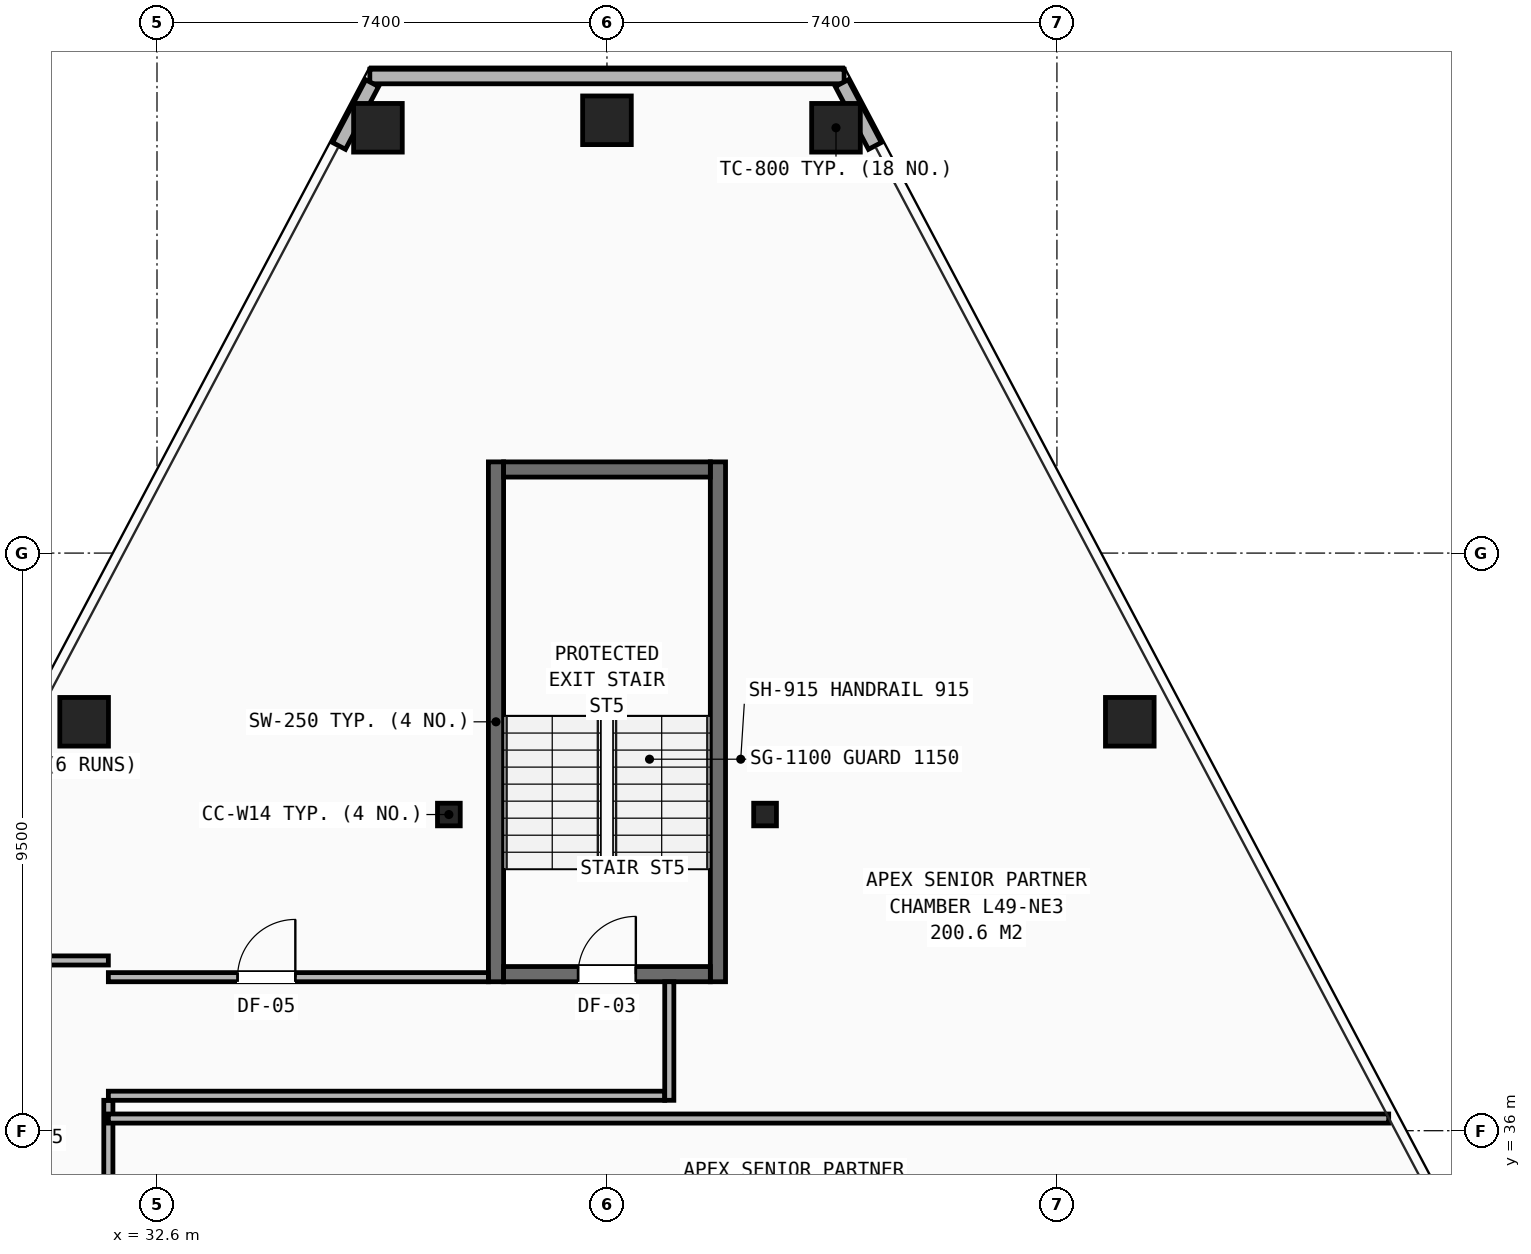
"""IFC4 building model, lengths in metres.
Left out: names, types, materials, properties, quantities, classifications, styles, units other than length and angle.
Written with IfcOpenShell. Run it as: python <this file> out.ifc"""

import sys

from ifc_helpers import new_model, si_unit, direction, frame, frame_2d, origin, origin_2d, place, context, subcontext, project, spatial, rectangle, hollow_rectangle, i_section, extrude, element, fill, save


model = new_model("IFC4")
c1 = context("Model", 3, precision=1e-05, world=origin(), true_north=direction((0.0, 1.0)))
c2 = subcontext(c1, "Body", "Model", "MODEL_VIEW")
j1 = project(units=[si_unit("LENGTHUNIT", "METRE"), si_unit("PLANEANGLEUNIT", "RADIAN")], contexts=[c1])
p1 = place(None, origin())
s1 = spatial("IfcSite", under=j1, at=p1, CompositionType="ELEMENT")
p2 = place(p1, origin())
s2 = spatial("IfcBuilding", under=s1, at=p2, CompositionType="ELEMENT")
p3 = place(p2, frame((0.0, 0.0, 172.35)))
s3 = spatial("IfcBuildingStorey", under=s2, at=p3, CompositionType="ELEMENT", Elevation=172.35)
for number, where, z_axis, x_axis in (
    (1, (37.4, 41.2, 0.0), (0.0, 0.0, 1.0), (1.0, 0.0, 0.0)),
    (2, (42.6, 41.2, 0.0), (0.0, 0.0, 1.0), (1.0, 0.0, 0.0)),
):
    element("IfcColumn", number, at=place(p3, frame(where, z_axis=z_axis, x_axis=x_axis)), inside=s3, PredefinedType="COLUMN", context=c2, shape_type="SweptSolid", body=[
        extrude(i_section(OverallWidth=0.374, OverallDepth=0.372, WebThickness=0.016, FlangeThickness=0.026, at=origin_2d()), origin(), (0.0, 0.0, 1.0), 3.45),
    ])
for number, where, z_axis, x_axis in (
    (3, (43.767, 52.495, 0.0), (0.0, 0.0, 1.0), (1.0, 0.0, 0.0)),
    (4, (40.0, 52.618, 0.0), (0.0, 0.0, 1.0), (1.0, 0.0, 0.0)),
    (5, (36.233, 52.495, 0.0), (0.0, 0.0, 1.0), (1.0, 0.0, 0.0)),
    (6, (31.402, 42.726, 0.0), (0.0, 0.0, 1.0), (1.0, 0.0, 0.0)),
    (7, (48.598, 42.726, 0.0), (0.0, 0.0, 1.0), (1.0, 0.0, 0.0)),
):
    element("IfcColumn", number, at=place(p3, frame(where, z_axis=z_axis, x_axis=x_axis)), inside=s3, PredefinedType="COLUMN", context=c2, shape_type="SweptSolid", body=[
        extrude(hollow_rectangle(XDim=0.8, YDim=0.8, WallThickness=0.055, at=origin_2d()), origin(), (0.0, 0.0, 1.0), 3.45),
    ])
p4 = place(p3, frame((36.1, 53.338, 0.0), z_axis=(0.0, 0.0, 1.0), x_axis=(1.0, 0.0, 0.0)))
e8 = element("IfcWall", 8, at=p4, inside=s3, PredefinedType="SHEAR", context=c2, shape_type="SweptSolid", body=[
    extrude(rectangle(XDim=7.8, YDim=0.24, at=frame_2d((3.9, 0.0))), origin(), (0.0, 0.0, 1.0), 2.583),
])
for number, where, z_axis, x_axis in (
    (9, (36.139, 53.229, 0.0), (0.0, 0.0, 1.0), (-0.467, -0.884, 0.0)),
    (10, (44.407, 52.197, 0.0), (0.0, 0.0, 1.0), (-0.467, 0.884, 0.0)),
):
    element("IfcWall", number, at=place(p3, frame(where, z_axis=z_axis, x_axis=x_axis)), inside=s3, PredefinedType="SHEAR", context=c2, shape_type="SweptSolid", body=[
        extrude(rectangle(XDim=1.167, YDim=0.24, at=frame_2d((0.584, 0.0))), origin(), (0.0, 0.0, 1.0), 2.583),
    ])
p5 = place(p3, frame((31.8, 31.2, 0.0), z_axis=(0.0, 0.0, 1.0), x_axis=(0.0, 1.0, 0.0)))
e11 = element("IfcWall", 11, at=p5, inside=s3, PredefinedType="PARTITIONING", context=c2, shape_type="SweptSolid", body=[
    extrude(rectangle(XDim=5.3, YDim=0.15, at=frame_2d((2.65, 0.0))), origin(), (0.0, 0.0, 1.0), 2.252),
])
p6 = place(p5, frame((0.5, 0.0, 0.0)))
e12 = element("IfcOpeningElement", 12, at=p6, cuts=e11, PredefinedType="OPENING", context=c2, shape_type="SweptSolid", body=[
    extrude(rectangle(XDim=0.95, YDim=2.1, at=frame_2d((0.475, 1.05))), frame((0.0, 0.085, 0.0), z_axis=(0.0, -1.0, 0.0), x_axis=(1.0, 0.0, 0.0)), (0.0, 0.0, 1.0), 0.17),
])
p7 = place(p5, frame((2.9, 0.0, 0.0)))
e13 = element("IfcOpeningElement", 13, at=p7, cuts=e11, PredefinedType="OPENING", context=c2, shape_type="SweptSolid", body=[
    extrude(rectangle(XDim=0.95, YDim=2.1, at=frame_2d((0.475, 1.05))), frame((0.0, 0.085, 0.0), z_axis=(0.0, -1.0, 0.0), x_axis=(1.0, 0.0, 0.0)), (0.0, 0.0, 1.0), 0.17),
])
p8 = place(p3, frame((29.6, 38.8, 0.0), z_axis=(0.0, 0.0, 1.0), x_axis=(1.0, 0.0, 0.0)))
e14 = element("IfcWall", 14, at=p8, inside=s3, PredefinedType="PARTITIONING", context=c2, shape_type="SweptSolid", body=[
    extrude(rectangle(XDim=2.2, YDim=0.15, at=frame_2d((1.1, 0.0))), origin(), (0.0, 0.0, 1.0), 2.589),
])
p9 = place(p3, frame((31.8, 36.2, 0.0), z_axis=(0.0, 0.0, 1.0), x_axis=(1.0, 0.0, 0.0)))
e15 = element("IfcWall", 15, at=p9, inside=s3, PredefinedType="PARTITIONING", context=c2, shape_type="SweptSolid", body=[
    extrude(rectangle(XDim=21.056, YDim=0.15, at=frame_2d((10.528, 0.0))), origin(), (0.0, 0.0, 1.0), 2.589),
])
for number, where, z_axis, x_axis in (
    (16, (38.175, 38.45, 0.0), (0.0, 0.0, 1.0), (0.0, 1.0, 0.0)),
    (17, (41.825, 38.45, 0.0), (0.0, 0.0, 1.0), (0.0, 1.0, 0.0)),
):
    element("IfcWall", number, at=place(p3, frame(where, z_axis=z_axis, x_axis=x_axis)), inside=s3, PredefinedType="SHEAR", context=c2, shape_type="SweptSolid", body=[
        extrude(rectangle(XDim=8.55, YDim=0.25, at=frame_2d((4.275, 0.0))), origin(), (0.0, 0.0, 1.0), 3.21),
    ])
p10 = place(p3, frame((38.3, 38.575, 0.0), z_axis=(0.0, 0.0, 1.0), x_axis=(1.0, 0.0, 0.0)))
e18 = element("IfcWall", 18, at=p10, inside=s3, PredefinedType="SHEAR", context=c2, shape_type="SweptSolid", body=[
    extrude(rectangle(XDim=3.4, YDim=0.25, at=frame_2d((1.7, 0.0))), origin(), (0.0, 0.0, 1.0), 3.21),
])
p11 = place(p10, frame((1.225, 0.0, 0.0)))
e19 = element("IfcOpeningElement", 19, at=p11, cuts=e18, PredefinedType="OPENING", context=c2, shape_type="SweptSolid", body=[
    extrude(rectangle(XDim=0.95, YDim=2.1, at=frame_2d((0.475, 1.05))), frame((0.0, 0.135, 0.0), z_axis=(0.0, -1.0, 0.0), x_axis=(1.0, 0.0, 0.0)), (0.0, 0.0, 1.0), 0.27),
])
p12 = place(p3, frame((38.3, 46.875, 0.0), z_axis=(0.0, 0.0, 1.0), x_axis=(1.0, 0.0, 0.0)))
e20 = element("IfcWall", 20, at=p12, inside=s3, PredefinedType="SHEAR", context=c2, shape_type="SweptSolid", body=[
    extrude(rectangle(XDim=3.4, YDim=0.25, at=frame_2d((1.7, 0.0))), origin(), (0.0, 0.0, 1.0), 3.21),
])
p13 = place(p3, frame((31.8, 36.575, 0.0), z_axis=(0.0, 0.0, 1.0), x_axis=(1.0, 0.0, 0.0)))
e21 = element("IfcWall", 21, at=p13, inside=s3, PredefinedType="PARTITIONING", context=c2, shape_type="SweptSolid", body=[
    extrude(rectangle(XDim=9.15, YDim=0.15, at=frame_2d((4.575, 0.0))), origin(), (0.0, 0.0, 1.0), 3.21),
])
p14 = place(p3, frame((31.8, 38.525, 0.0), z_axis=(0.0, 0.0, 1.0), x_axis=(1.0, 0.0, 0.0)))
e22 = element("IfcWall", 22, at=p14, inside=s3, PredefinedType="PARTITIONING", context=c2, shape_type="SweptSolid", body=[
    extrude(rectangle(XDim=6.25, YDim=0.15, at=frame_2d((3.125, 0.0))), origin(), (0.0, 0.0, 1.0), 2.793),
])
p15 = place(p14, frame((2.125, 0.0, 0.0)))
e23 = element("IfcOpeningElement", 23, at=p15, cuts=e22, PredefinedType="OPENING", context=c2, shape_type="SweptSolid", body=[
    extrude(rectangle(XDim=0.95, YDim=2.1, at=frame_2d((0.475, 1.05))), frame((0.0, 0.085, 0.0), z_axis=(0.0, -1.0, 0.0), x_axis=(1.0, 0.0, 0.0)), (0.0, 0.0, 1.0), 0.17),
])
p16 = place(p3, frame((41.025, 36.5, 0.0), z_axis=(0.0, 0.0, 1.0), x_axis=(0.0, 1.0, 0.0)))
e24 = element("IfcWall", 24, at=p16, inside=s3, PredefinedType="PARTITIONING", context=c2, shape_type="SweptSolid", body=[
    extrude(rectangle(XDim=1.95, YDim=0.15, at=frame_2d((0.975, 0.0))), origin(), (0.0, 0.0, 1.0), 3.21),
])
p17 = place(p15, origin())
e25 = element("IfcDoor", 25, at=p17, inside=s3, OperationType="SINGLE_SWING_RIGHT", PredefinedType="DOOR", context=c2, shape_type="SweptSolid", body=[
    extrude(rectangle(XDim=0.95, YDim=2.1, at=frame_2d((0.475, 1.05))), frame((0.0, 0.025, 0.0), z_axis=(0.0, -1.0, 0.0), x_axis=(1.0, 0.0, 0.0)), (0.0, 0.0, 1.0), 0.05),
])
fill(e23, e25)
p18 = place(p11, origin())
e26 = element("IfcDoor", 26, at=p18, inside=s3, OperationType="SINGLE_SWING_RIGHT", PredefinedType="DOOR", context=c2, shape_type="SweptSolid", body=[
    extrude(rectangle(XDim=0.95, YDim=2.1, at=frame_2d((0.475, 1.05))), frame((0.0, 0.025, 0.0), z_axis=(0.0, -1.0, 0.0), x_axis=(1.0, 0.0, 0.0)), (0.0, 0.0, 1.0), 0.05),
])
fill(e19, e26)
save(model, sys.argv[1])
